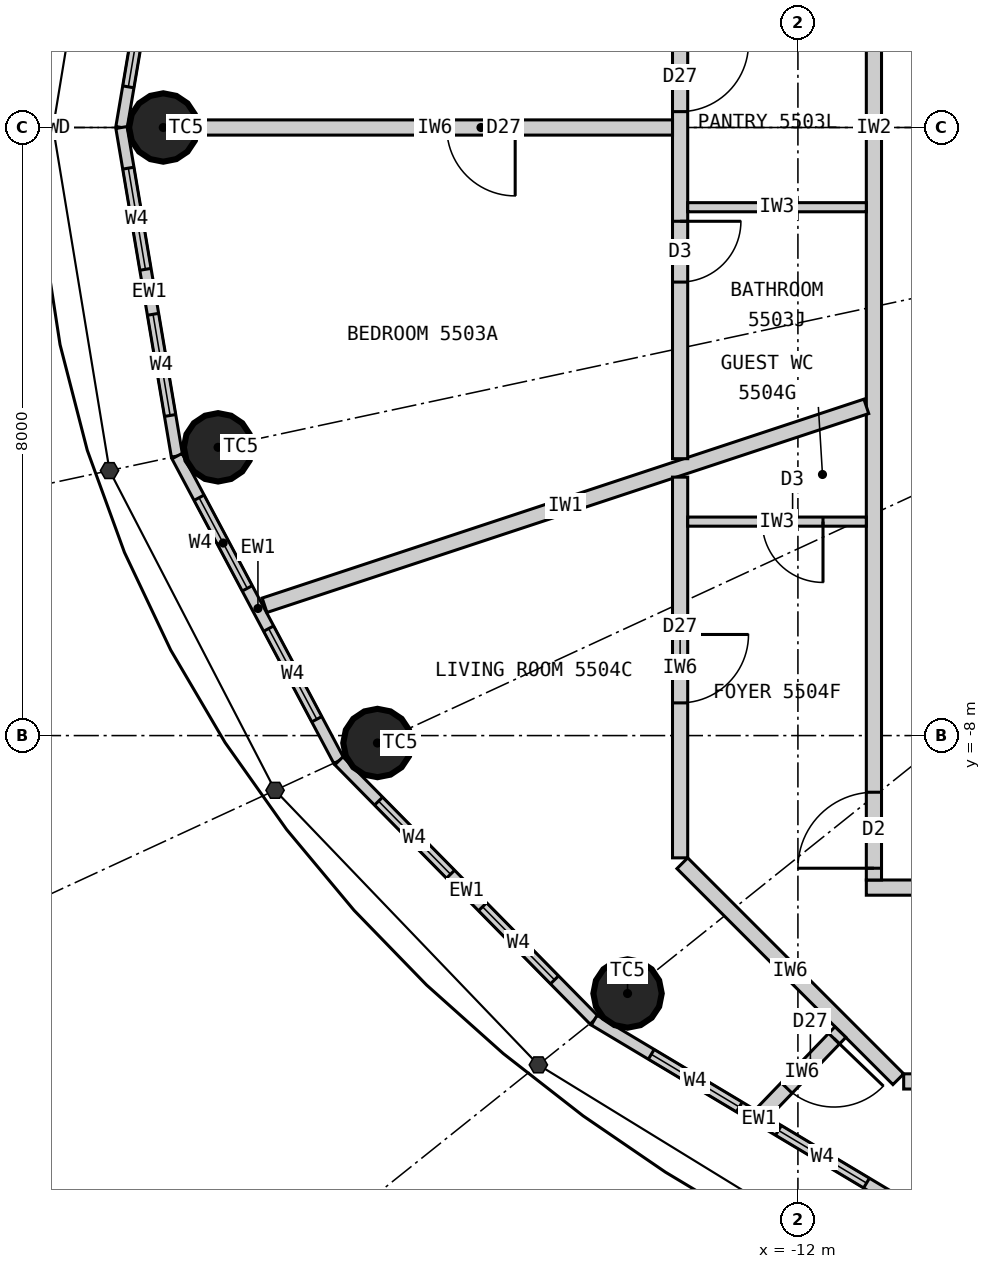
"""IFC4 building model, lengths in metres.
Left out: names, types, materials, properties, quantities, classifications, styles, units other than length and angle.
Written with IfcOpenShell. Run it as: python <this file> out.ifc"""

import sys

from ifc_helpers import new_model, si_unit, direction, frame, frame_2d, origin, origin_2d, place, context, subcontext, project, spatial, rectangle, circle, extrude, element, fill, save


model = new_model("IFC4")
c1 = context("Model", 3, precision=1e-05, world=origin(), true_north=direction((0.0, 1.0)))
c2 = subcontext(c1, "Body", "Model", "MODEL_VIEW")
j1 = project(units=[si_unit("LENGTHUNIT", "METRE"), si_unit("PLANEANGLEUNIT", "RADIAN")], contexts=[c1])
p1 = place(None, origin())
s1 = spatial("IfcSite", under=j1, at=p1, CompositionType="ELEMENT")
p2 = place(p1, origin())
s2 = spatial("IfcBuilding", under=s1, at=p2, CompositionType="ELEMENT")
p3 = place(p2, frame((0.0, 0.0, 206.1)))
s3 = spatial("IfcBuildingStorey", under=s2, at=p3, CompositionType="ELEMENT", Elevation=206.1)
for number, where, z_axis, x_axis in (
    (1, (-20.35, 0.0, 0.0), (0.0, 0.0, 1.0), (1.0, 0.0, 0.0)),
    (2, (-19.629, -4.208, 0.0), (0.0, 0.0, 1.0), (1.0, 0.0, 0.0)),
    (3, (-17.532, -8.098, 0.0), (0.0, 0.0, 1.0), (1.0, 0.0, 0.0)),
    (4, (-14.241, -11.393, 0.0), (0.0, 0.0, 1.0), (1.0, 0.0, 0.0)),
):
    element("IfcColumn", number, at=place(p3, frame(where, z_axis=z_axis, x_axis=x_axis)), inside=s3, PredefinedType="COLUMN", context=c2, shape_type="SweptSolid", body=[
        extrude(circle(Radius=0.45, at=origin_2d()), origin(), (0.0, 0.0, 1.0), 3.3),
    ])
p4 = place(p3, frame((-20.17, 4.323, 0.0), z_axis=(0.0, 0.0, 1.0), x_axis=(-0.166538513568, -0.986034950445, 0.0)))
e5 = element("IfcWall", 5, at=p4, inside=s3, PredefinedType="ELEMENTEDWALL", context=c2, shape_type="SweptSolid", body=[
    extrude(rectangle(XDim=4.385, YDim=0.15, at=frame_2d((2.192, 0.0))), origin(), (0.0, 0.0, 1.0), 3.12),
])
p5 = place(p4, frame((0.542, 0.0, 0.9)))
e6 = element("IfcOpeningElement", 6, at=p5, cuts=e5, PredefinedType="OPENING", context=c2, shape_type="SweptSolid", body=[
    extrude(rectangle(XDim=1.35, YDim=1.9, at=frame_2d((0.675, 0.95))), frame((0.0, 0.085, 0.0), z_axis=(0.0, -1.0, 0.0), x_axis=(1.0, 0.0, 0.0)), (0.0, 0.0, 1.0), 0.17),
])
p6 = place(p4, frame((2.492, 0.0, 0.9)))
e7 = element("IfcOpeningElement", 7, at=p6, cuts=e5, PredefinedType="OPENING", context=c2, shape_type="SweptSolid", body=[
    extrude(rectangle(XDim=1.35, YDim=1.9, at=frame_2d((0.675, 0.95))), frame((0.0, 0.085, 0.0), z_axis=(0.0, -1.0, 0.0), x_axis=(1.0, 0.0, 0.0)), (0.0, 0.0, 1.0), 0.17),
])
p7 = place(p3, frame((-20.9, 0.0, 0.0), z_axis=(0.0, 0.0, 1.0), x_axis=(0.166538513568, -0.986034950445, 0.0)))
e8 = element("IfcWall", 8, at=p7, inside=s3, PredefinedType="ELEMENTEDWALL", context=c2, shape_type="SweptSolid", body=[
    extrude(rectangle(XDim=4.385, YDim=0.15, at=frame_2d((2.192, 0.0))), origin(), (0.0, 0.0, 1.0), 3.12),
])
p8 = place(p7, frame((0.542, 0.0, 0.9)))
e9 = element("IfcOpeningElement", 9, at=p8, cuts=e8, PredefinedType="OPENING", context=c2, shape_type="SweptSolid", body=[
    extrude(rectangle(XDim=1.35, YDim=1.9, at=frame_2d((0.675, 0.95))), frame((0.0, 0.085, 0.0), z_axis=(0.0, -1.0, 0.0), x_axis=(1.0, 0.0, 0.0)), (0.0, 0.0, 1.0), 0.17),
])
p9 = place(p7, frame((2.492, 0.0, 0.9)))
e10 = element("IfcOpeningElement", 10, at=p9, cuts=e8, PredefinedType="OPENING", context=c2, shape_type="SweptSolid", body=[
    extrude(rectangle(XDim=1.35, YDim=1.9, at=frame_2d((0.675, 0.95))), frame((0.0, 0.085, 0.0), z_axis=(0.0, -1.0, 0.0), x_axis=(1.0, 0.0, 0.0)), (0.0, 0.0, 1.0), 0.17),
])
p10 = place(p3, frame((-20.17, -4.323, 0.0), z_axis=(0.0, 0.0, 1.0), x_axis=(0.469256152955, -0.883062094597, 0.0)))
e11 = element("IfcWall", 11, at=p10, inside=s3, PredefinedType="ELEMENTEDWALL", context=c2, shape_type="SweptSolid", body=[
    extrude(rectangle(XDim=4.539, YDim=0.15, at=frame_2d((2.27, 0.0))), origin(), (0.0, 0.0, 1.0), 3.12),
])
p11 = place(p10, frame((0.62, 0.0, 0.9)))
e12 = element("IfcOpeningElement", 12, at=p11, cuts=e11, PredefinedType="OPENING", context=c2, shape_type="SweptSolid", body=[
    extrude(rectangle(XDim=1.35, YDim=1.9, at=frame_2d((0.675, 0.95))), frame((0.0, 0.085, 0.0), z_axis=(0.0, -1.0, 0.0), x_axis=(1.0, 0.0, 0.0)), (0.0, 0.0, 1.0), 0.17),
])
p12 = place(p10, frame((2.57, 0.0, 0.9)))
e13 = element("IfcOpeningElement", 13, at=p12, cuts=e11, PredefinedType="OPENING", context=c2, shape_type="SweptSolid", body=[
    extrude(rectangle(XDim=1.35, YDim=1.9, at=frame_2d((0.675, 0.95))), frame((0.0, 0.085, 0.0), z_axis=(0.0, -1.0, 0.0), x_axis=(1.0, 0.0, 0.0)), (0.0, 0.0, 1.0), 0.17),
])
p13 = place(p3, frame((-18.04, -8.332, 0.0), z_axis=(0.0, 0.0, 1.0), x_axis=(0.701527379618, -0.712642501993, 0.0)))
e14 = element("IfcWall", 14, at=p13, inside=s3, PredefinedType="ELEMENTEDWALL", context=c2, shape_type="SweptSolid", body=[
    extrude(rectangle(XDim=4.788, YDim=0.15, at=frame_2d((2.394, 0.0))), origin(), (0.0, 0.0, 1.0), 3.12),
])
p14 = place(p13, frame((0.744, 0.0, 0.9)))
e15 = element("IfcOpeningElement", 15, at=p14, cuts=e14, PredefinedType="OPENING", context=c2, shape_type="SweptSolid", body=[
    extrude(rectangle(XDim=1.35, YDim=1.9, at=frame_2d((0.675, 0.95))), frame((0.0, 0.085, 0.0), z_axis=(0.0, -1.0, 0.0), x_axis=(1.0, 0.0, 0.0)), (0.0, 0.0, 1.0), 0.17),
])
p15 = place(p13, frame((2.694, 0.0, 0.9)))
e16 = element("IfcOpeningElement", 16, at=p15, cuts=e14, PredefinedType="OPENING", context=c2, shape_type="SweptSolid", body=[
    extrude(rectangle(XDim=1.35, YDim=1.9, at=frame_2d((0.675, 0.95))), frame((0.0, 0.085, 0.0), z_axis=(0.0, -1.0, 0.0), x_axis=(1.0, 0.0, 0.0)), (0.0, 0.0, 1.0), 0.17),
])
p16 = place(p3, frame((-14.68, -11.744, 0.0), z_axis=(0.0, 0.0, 1.0), x_axis=(0.85822150553, -0.513279502265, 0.0)))
e17 = element("IfcWall", 17, at=p16, inside=s3, PredefinedType="ELEMENTEDWALL", context=c2, shape_type="SweptSolid", body=[
    extrude(rectangle(XDim=5.05, YDim=0.15, at=frame_2d((2.525, 0.0))), origin(), (0.0, 0.0, 1.0), 3.12),
])
p17 = place(p16, frame((0.875, 0.0, 0.9)))
e18 = element("IfcOpeningElement", 18, at=p17, cuts=e17, PredefinedType="OPENING", context=c2, shape_type="SweptSolid", body=[
    extrude(rectangle(XDim=1.35, YDim=1.9, at=frame_2d((0.675, 0.95))), frame((0.0, 0.085, 0.0), z_axis=(0.0, -1.0, 0.0), x_axis=(1.0, 0.0, 0.0)), (0.0, 0.0, 1.0), 0.17),
])
p18 = place(p16, frame((2.825, 0.0, 0.9)))
e19 = element("IfcOpeningElement", 19, at=p18, cuts=e17, PredefinedType="OPENING", context=c2, shape_type="SweptSolid", body=[
    extrude(rectangle(XDim=1.35, YDim=1.9, at=frame_2d((0.675, 0.95))), frame((0.0, 0.085, 0.0), z_axis=(0.0, -1.0, 0.0), x_axis=(1.0, 0.0, 0.0)), (0.0, 0.0, 1.0), 0.17),
])
p19 = place(p3, frame((11.1, -10.0, 0.0), z_axis=(0.0, 0.0, 1.0), x_axis=(-1.0, 0.0, 0.0)))
e20 = element("IfcWall", 20, at=p19, inside=s3, PredefinedType="PARTITIONING", context=c2, shape_type="SweptSolid", body=[
    extrude(rectangle(XDim=22.2, YDim=0.2, at=frame_2d((11.1, 0.0))), origin(), (0.0, 0.0, 1.0), 3.12),
])
p20 = place(p19, frame((11.36, 0.0, 0.0)))
e21 = element("IfcOpeningElement", 21, at=p20, cuts=e20, PredefinedType="OPENING", context=c2, shape_type="SweptSolid", body=[
    extrude(rectangle(XDim=1.0, YDim=2.2, at=frame_2d((0.5, 1.1))), frame((0.0, 0.11, 0.0), z_axis=(0.0, -1.0, 0.0), x_axis=(1.0, 0.0, 0.0)), (0.0, 0.0, 1.0), 0.22),
])
p21 = place(p19, frame((0.595, 0.0, 0.0)))
e22 = element("IfcOpeningElement", 22, at=p21, cuts=e20, PredefinedType="OPENING", context=c2, shape_type="SweptSolid", body=[
    extrude(rectangle(XDim=1.0, YDim=2.2, at=frame_2d((0.5, 1.1))), frame((0.0, 0.11, 0.0), z_axis=(0.0, -1.0, 0.0), x_axis=(1.0, 0.0, 0.0)), (0.0, 0.0, 1.0), 0.22),
])
p22 = place(p3, frame((-11.0, 9.9, 0.0), z_axis=(0.0, 0.0, 1.0), x_axis=(0.0, -1.0, 0.0)))
e23 = element("IfcWall", 23, at=p22, inside=s3, PredefinedType="PARTITIONING", context=c2, shape_type="SweptSolid", body=[
    extrude(rectangle(XDim=19.8, YDim=0.2, at=frame_2d((9.9, 0.0))), origin(), (0.0, 0.0, 1.0), 3.12),
])
p23 = place(p22, frame((5.075, 0.0, 0.0)))
e24 = element("IfcOpeningElement", 24, at=p23, cuts=e23, PredefinedType="OPENING", context=c2, shape_type="SweptSolid", body=[
    extrude(rectangle(XDim=1.0, YDim=2.2, at=frame_2d((0.5, 1.1))), frame((0.0, 0.11, 0.0), z_axis=(0.0, -1.0, 0.0), x_axis=(1.0, 0.0, 0.0)), (0.0, 0.0, 1.0), 0.22),
])
p24 = place(p22, frame((18.645, 0.0, 0.0)))
e25 = element("IfcOpeningElement", 25, at=p24, cuts=e23, PredefinedType="OPENING", context=c2, shape_type="SweptSolid", body=[
    extrude(rectangle(XDim=1.0, YDim=2.2, at=frame_2d((0.5, 1.1))), frame((0.0, 0.11, 0.0), z_axis=(0.0, -1.0, 0.0), x_axis=(1.0, 0.0, 0.0)), (0.0, 0.0, 1.0), 0.22),
])
p25 = place(p3, frame((-11.1, -3.669, 0.0), z_axis=(0.0, 0.0, 1.0), x_axis=(-0.949476668397, -0.313837627079, 0.0)))
e26 = element("IfcWall", 26, at=p25, inside=s3, PredefinedType="PARTITIONING", context=c2, shape_type="SweptSolid", body=[
    extrude(rectangle(XDim=8.339, YDim=0.2, at=frame_2d((4.169, 0.0))), origin(), (0.0, 0.0, 1.0), 3.12),
])
p26 = place(p3, frame((-13.55, 8.139, 0.0), z_axis=(0.0, 0.0, 1.0), x_axis=(0.0, -1.0, 0.0)))
e27 = element("IfcWall", 27, at=p26, inside=s3, PredefinedType="PARTITIONING", context=c2, shape_type="SweptSolid", body=[
    extrude(rectangle(XDim=12.496, YDim=0.2, at=frame_2d((6.248, 0.0))), origin(), (0.0, 0.0, 1.0), 3.12),
])
p27 = place(p26, frame((7.031, 0.0, 0.0)))
e28 = element("IfcOpeningElement", 28, at=p27, cuts=e27, PredefinedType="OPENING", context=c2, shape_type="SweptSolid", body=[
    extrude(rectangle(XDim=0.9, YDim=2.1, at=frame_2d((0.45, 1.05))), frame((0.0, 0.11, 0.0), z_axis=(0.0, -1.0, 0.0), x_axis=(1.0, 0.0, 0.0)), (0.0, 0.0, 1.0), 0.22),
])
p28 = place(p26, frame((9.373, 0.0, 0.0)))
e29 = element("IfcOpeningElement", 29, at=p28, cuts=e27, PredefinedType="OPENING", context=c2, shape_type="SweptSolid", body=[
    extrude(rectangle(XDim=0.8, YDim=2.1, at=frame_2d((0.4, 1.05))), frame((0.0, 0.11, 0.0), z_axis=(0.0, -1.0, 0.0), x_axis=(1.0, 0.0, 0.0)), (0.0, 0.0, 1.0), 0.22),
])
p29 = place(p26, frame((3.789, 0.0, 0.0)))
e30 = element("IfcOpeningElement", 30, at=p29, cuts=e27, PredefinedType="OPENING", context=c2, shape_type="SweptSolid", body=[
    extrude(rectangle(XDim=0.9, YDim=2.1, at=frame_2d((0.45, 1.05))), frame((0.0, 0.11, 0.0), z_axis=(0.0, -1.0, 0.0), x_axis=(1.0, 0.0, 0.0)), (0.0, 0.0, 1.0), 0.22),
])
p30 = place(p3, frame((-13.65, 0.0, 0.0), z_axis=(0.0, 0.0, 1.0), x_axis=(-1.0, 0.0, 0.0)))
e31 = element("IfcWall", 31, at=p30, inside=s3, PredefinedType="PARTITIONING", context=c2, shape_type="SweptSolid", body=[
    extrude(rectangle(XDim=6.25, YDim=0.2, at=frame_2d((3.125, 0.0))), origin(), (0.0, 0.0, 1.0), 2.37),
])
p31 = place(p30, frame((2.07, 0.0, 0.0)))
e32 = element("IfcOpeningElement", 32, at=p31, cuts=e31, PredefinedType="OPENING", context=c2, shape_type="SweptSolid", body=[
    extrude(rectangle(XDim=0.9, YDim=2.1, at=frame_2d((0.45, 1.05))), frame((0.0, 0.11, 0.0), z_axis=(0.0, -1.0, 0.0), x_axis=(1.0, 0.0, 0.0)), (0.0, 0.0, 1.0), 0.22),
])
p32 = place(p3, frame((-11.1, -1.049, 0.0), z_axis=(0.0, 0.0, 1.0), x_axis=(-1.0, 0.0, 0.0)))
e33 = element("IfcWall", 33, at=p32, inside=s3, PredefinedType="PARTITIONING", context=c2, shape_type="SweptSolid", body=[
    extrude(rectangle(XDim=2.35, YDim=0.12, at=frame_2d((1.175, 0.0))), origin(), (0.0, 0.0, 1.0), 3.12),
])
p33 = place(p3, frame((-13.55, -4.6, 0.0), z_axis=(0.0, 0.0, 1.0), x_axis=(0.0, -1.0, 0.0)))
e34 = element("IfcWall", 34, at=p33, inside=s3, PredefinedType="PARTITIONING", context=c2, shape_type="SweptSolid", body=[
    extrude(rectangle(XDim=5.009, YDim=0.2, at=frame_2d((2.504, 0.0))), origin(), (0.0, 0.0, 1.0), 3.12),
])
p34 = place(p33, frame((2.07, 0.0, 0.0)))
e35 = element("IfcOpeningElement", 35, at=p34, cuts=e34, PredefinedType="OPENING", context=c2, shape_type="SweptSolid", body=[
    extrude(rectangle(XDim=0.9, YDim=2.1, at=frame_2d((0.45, 1.05))), frame((0.0, 0.11, 0.0), z_axis=(0.0, -1.0, 0.0), x_axis=(1.0, 0.0, 0.0)), (0.0, 0.0, 1.0), 0.22),
])
p35 = place(p3, frame((-13.521, -9.679, 0.0), z_axis=(0.0, 0.0, 1.0), x_axis=(0.707106781187, -0.707106781187, 0.0)))
e36 = element("IfcWall", 36, at=p35, inside=s3, PredefinedType="PARTITIONING", context=c2, shape_type="SweptSolid", body=[
    extrude(rectangle(XDim=4.019, YDim=0.2, at=frame_2d((2.009, 0.0))), origin(), (0.0, 0.0, 1.0), 3.12),
])
p36 = place(p3, frame((-10.609, -12.55, 0.0), z_axis=(0.0, 0.0, 1.0), x_axis=(1.0, 0.0, 0.0)))
e37 = element("IfcWall", 37, at=p36, inside=s3, PredefinedType="PARTITIONING", context=c2, shape_type="SweptSolid", body=[
    extrude(rectangle(XDim=6.284, YDim=0.2, at=frame_2d((3.142, 0.0))), origin(), (0.0, 0.0, 1.0), 3.12),
])
p37 = place(p36, frame((4.944, 0.0, 0.0)))
e38 = element("IfcOpeningElement", 38, at=p37, cuts=e37, PredefinedType="OPENING", context=c2, shape_type="SweptSolid", body=[
    extrude(rectangle(XDim=0.8, YDim=2.1, at=frame_2d((0.4, 1.05))), frame((0.0, 0.11, 0.0), z_axis=(0.0, -1.0, 0.0), x_axis=(1.0, 0.0, 0.0)), (0.0, 0.0, 1.0), 0.22),
])
p38 = place(p3, frame((-11.441, -11.9, 0.0), z_axis=(0.0, 0.0, 1.0), x_axis=(-0.692958717259, -0.720977264672, 0.0)))
e39 = element("IfcWall", 39, at=p38, inside=s3, PredefinedType="PARTITIONING", context=c2, shape_type="SweptSolid", body=[
    extrude(rectangle(XDim=1.464, YDim=0.2, at=frame_2d((0.732, 0.0))), origin(), (0.0, 0.0, 1.0), 3.12),
])
p39 = place(p38, frame((0.12, 0.0, 0.0)))
e40 = element("IfcOpeningElement", 40, at=p39, cuts=e39, PredefinedType="OPENING", context=c2, shape_type="SweptSolid", body=[
    extrude(rectangle(XDim=0.9, YDim=2.1, at=frame_2d((0.45, 1.05))), frame((0.0, 0.11, 0.0), z_axis=(0.0, -1.0, 0.0), x_axis=(1.0, 0.0, 0.0)), (0.0, 0.0, 1.0), 0.22),
])
p40 = place(p3, frame((-11.1, -5.185, 0.0), z_axis=(0.0, 0.0, 1.0), x_axis=(-1.0, 0.0, 0.0)))
e41 = element("IfcWall", 41, at=p40, inside=s3, PredefinedType="PARTITIONING", context=c2, shape_type="SweptSolid", body=[
    extrude(rectangle(XDim=2.35, YDim=0.12, at=frame_2d((1.175, 0.0))), origin(), (0.0, 0.0, 1.0), 3.12),
])
p41 = place(p40, frame((0.57, 0.0, 0.0)))
e42 = element("IfcOpeningElement", 42, at=p41, cuts=e41, PredefinedType="OPENING", context=c2, shape_type="SweptSolid", body=[
    extrude(rectangle(XDim=0.8, YDim=2.1, at=frame_2d((0.4, 1.05))), frame((0.0, 0.07, 0.0), z_axis=(0.0, -1.0, 0.0), x_axis=(1.0, 0.0, 0.0)), (0.0, 0.0, 1.0), 0.14),
])
p42 = place(p6, origin())
e43 = element("IfcWindow", 43, at=p42, inside=s3, PartitioningType="SINGLE_PANEL", PredefinedType="WINDOW", context=c2, shape_type="SweptSolid", body=[
    extrude(rectangle(XDim=1.35, YDim=1.9, at=frame_2d((0.675, 0.95))), frame((0.0, 0.03, 0.0), z_axis=(0.0, -1.0, 0.0), x_axis=(1.0, 0.0, 0.0)), (0.0, 0.0, 1.0), 0.06),
])
fill(e7, e43)
p43 = place(p8, origin())
e44 = element("IfcWindow", 44, at=p43, inside=s3, PartitioningType="SINGLE_PANEL", PredefinedType="WINDOW", context=c2, shape_type="SweptSolid", body=[
    extrude(rectangle(XDim=1.35, YDim=1.9, at=frame_2d((0.675, 0.95))), frame((0.0, 0.03, 0.0), z_axis=(0.0, -1.0, 0.0), x_axis=(1.0, 0.0, 0.0)), (0.0, 0.0, 1.0), 0.06),
])
fill(e9, e44)
p44 = place(p9, origin())
e45 = element("IfcWindow", 45, at=p44, inside=s3, PartitioningType="SINGLE_PANEL", PredefinedType="WINDOW", context=c2, shape_type="SweptSolid", body=[
    extrude(rectangle(XDim=1.35, YDim=1.9, at=frame_2d((0.675, 0.95))), frame((0.0, 0.03, 0.0), z_axis=(0.0, -1.0, 0.0), x_axis=(1.0, 0.0, 0.0)), (0.0, 0.0, 1.0), 0.06),
])
fill(e10, e45)
p45 = place(p11, origin())
e46 = element("IfcWindow", 46, at=p45, inside=s3, PartitioningType="SINGLE_PANEL", PredefinedType="WINDOW", context=c2, shape_type="SweptSolid", body=[
    extrude(rectangle(XDim=1.35, YDim=1.9, at=frame_2d((0.675, 0.95))), frame((0.0, 0.03, 0.0), z_axis=(0.0, -1.0, 0.0), x_axis=(1.0, 0.0, 0.0)), (0.0, 0.0, 1.0), 0.06),
])
fill(e12, e46)
p46 = place(p12, origin())
e47 = element("IfcWindow", 47, at=p46, inside=s3, PartitioningType="SINGLE_PANEL", PredefinedType="WINDOW", context=c2, shape_type="SweptSolid", body=[
    extrude(rectangle(XDim=1.35, YDim=1.9, at=frame_2d((0.675, 0.95))), frame((0.0, 0.03, 0.0), z_axis=(0.0, -1.0, 0.0), x_axis=(1.0, 0.0, 0.0)), (0.0, 0.0, 1.0), 0.06),
])
fill(e13, e47)
p47 = place(p14, origin())
e48 = element("IfcWindow", 48, at=p47, inside=s3, PartitioningType="SINGLE_PANEL", PredefinedType="WINDOW", context=c2, shape_type="SweptSolid", body=[
    extrude(rectangle(XDim=1.35, YDim=1.9, at=frame_2d((0.675, 0.95))), frame((0.0, 0.03, 0.0), z_axis=(0.0, -1.0, 0.0), x_axis=(1.0, 0.0, 0.0)), (0.0, 0.0, 1.0), 0.06),
])
fill(e15, e48)
p48 = place(p15, origin())
e49 = element("IfcWindow", 49, at=p48, inside=s3, PartitioningType="SINGLE_PANEL", PredefinedType="WINDOW", context=c2, shape_type="SweptSolid", body=[
    extrude(rectangle(XDim=1.35, YDim=1.9, at=frame_2d((0.675, 0.95))), frame((0.0, 0.03, 0.0), z_axis=(0.0, -1.0, 0.0), x_axis=(1.0, 0.0, 0.0)), (0.0, 0.0, 1.0), 0.06),
])
fill(e16, e49)
p49 = place(p17, origin())
e50 = element("IfcWindow", 50, at=p49, inside=s3, PartitioningType="SINGLE_PANEL", PredefinedType="WINDOW", context=c2, shape_type="SweptSolid", body=[
    extrude(rectangle(XDim=1.35, YDim=1.9, at=frame_2d((0.675, 0.95))), frame((0.0, 0.03, 0.0), z_axis=(0.0, -1.0, 0.0), x_axis=(1.0, 0.0, 0.0)), (0.0, 0.0, 1.0), 0.06),
])
fill(e18, e50)
p50 = place(p18, origin())
e51 = element("IfcWindow", 51, at=p50, inside=s3, PartitioningType="SINGLE_PANEL", PredefinedType="WINDOW", context=c2, shape_type="SweptSolid", body=[
    extrude(rectangle(XDim=1.35, YDim=1.9, at=frame_2d((0.675, 0.95))), frame((0.0, 0.03, 0.0), z_axis=(0.0, -1.0, 0.0), x_axis=(1.0, 0.0, 0.0)), (0.0, 0.0, 1.0), 0.06),
])
fill(e19, e51)
p51 = place(p27, origin())
e52 = element("IfcDoor", 52, at=p51, inside=s3, OperationType="SINGLE_SWING_LEFT", PredefinedType="DOOR", context=c2, shape_type="SweptSolid", body=[
    extrude(rectangle(XDim=0.9, YDim=2.1, at=frame_2d((0.45, 1.05))), frame((0.0, 0.025, 0.0), z_axis=(0.0, -1.0, 0.0), x_axis=(1.0, 0.0, 0.0)), (0.0, 0.0, 1.0), 0.05),
])
fill(e28, e52)
p52 = place(p28, origin())
e53 = element("IfcDoor", 53, at=p52, inside=s3, OperationType="SINGLE_SWING_LEFT", PredefinedType="DOOR", context=c2, shape_type="SweptSolid", body=[
    extrude(rectangle(XDim=0.8, YDim=2.1, at=frame_2d((0.4, 1.05))), frame((0.0, 0.025, 0.0), z_axis=(0.0, -1.0, 0.0), x_axis=(1.0, 0.0, 0.0)), (0.0, 0.0, 1.0), 0.05),
])
fill(e29, e53)
p53 = place(p31, origin())
e54 = element("IfcDoor", 54, at=p53, inside=s3, OperationType="SINGLE_SWING_LEFT", PredefinedType="DOOR", context=c2, shape_type="SweptSolid", body=[
    extrude(rectangle(XDim=0.9, YDim=2.1, at=frame_2d((0.45, 1.05))), frame((0.0, 0.025, 0.0), z_axis=(0.0, -1.0, 0.0), x_axis=(1.0, 0.0, 0.0)), (0.0, 0.0, 1.0), 0.05),
])
fill(e32, e54)
p54 = place(p24, origin())
e55 = element("IfcDoor", 55, at=p54, inside=s3, OperationType="SINGLE_SWING_RIGHT", PredefinedType="DOOR", context=c2, shape_type="SweptSolid", body=[
    extrude(rectangle(XDim=1.0, YDim=2.2, at=frame_2d((0.5, 1.1))), frame((0.0, 0.025, 0.0), z_axis=(0.0, -1.0, 0.0), x_axis=(1.0, 0.0, 0.0)), (0.0, 0.0, 1.0), 0.05),
])
fill(e25, e55)
p55 = place(p41, origin())
e56 = element("IfcDoor", 56, at=p55, inside=s3, OperationType="SINGLE_SWING_LEFT", PredefinedType="DOOR", context=c2, shape_type="SweptSolid", body=[
    extrude(rectangle(XDim=0.8, YDim=2.1, at=frame_2d((0.4, 1.05))), frame((0.0, 0.025, 0.0), z_axis=(0.0, -1.0, 0.0), x_axis=(1.0, 0.0, 0.0)), (0.0, 0.0, 1.0), 0.05),
])
fill(e42, e56)
p56 = place(p34, origin())
e57 = element("IfcDoor", 57, at=p56, inside=s3, OperationType="SINGLE_SWING_LEFT", PredefinedType="DOOR", context=c2, shape_type="SweptSolid", body=[
    extrude(rectangle(XDim=0.9, YDim=2.1, at=frame_2d((0.45, 1.05))), frame((0.0, 0.025, 0.0), z_axis=(0.0, -1.0, 0.0), x_axis=(1.0, 0.0, 0.0)), (0.0, 0.0, 1.0), 0.05),
])
fill(e35, e57)
p57 = place(p39, origin())
e58 = element("IfcDoor", 58, at=p57, inside=s3, OperationType="SINGLE_SWING_LEFT", PredefinedType="DOOR", context=c2, shape_type="SweptSolid", body=[
    extrude(rectangle(XDim=0.9, YDim=2.1, at=frame_2d((0.45, 1.05))), frame((0.0, 0.025, 0.0), z_axis=(0.0, -1.0, 0.0), x_axis=(1.0, 0.0, 0.0)), (0.0, 0.0, 1.0), 0.05),
])
fill(e40, e58)
save(model, sys.argv[1])
